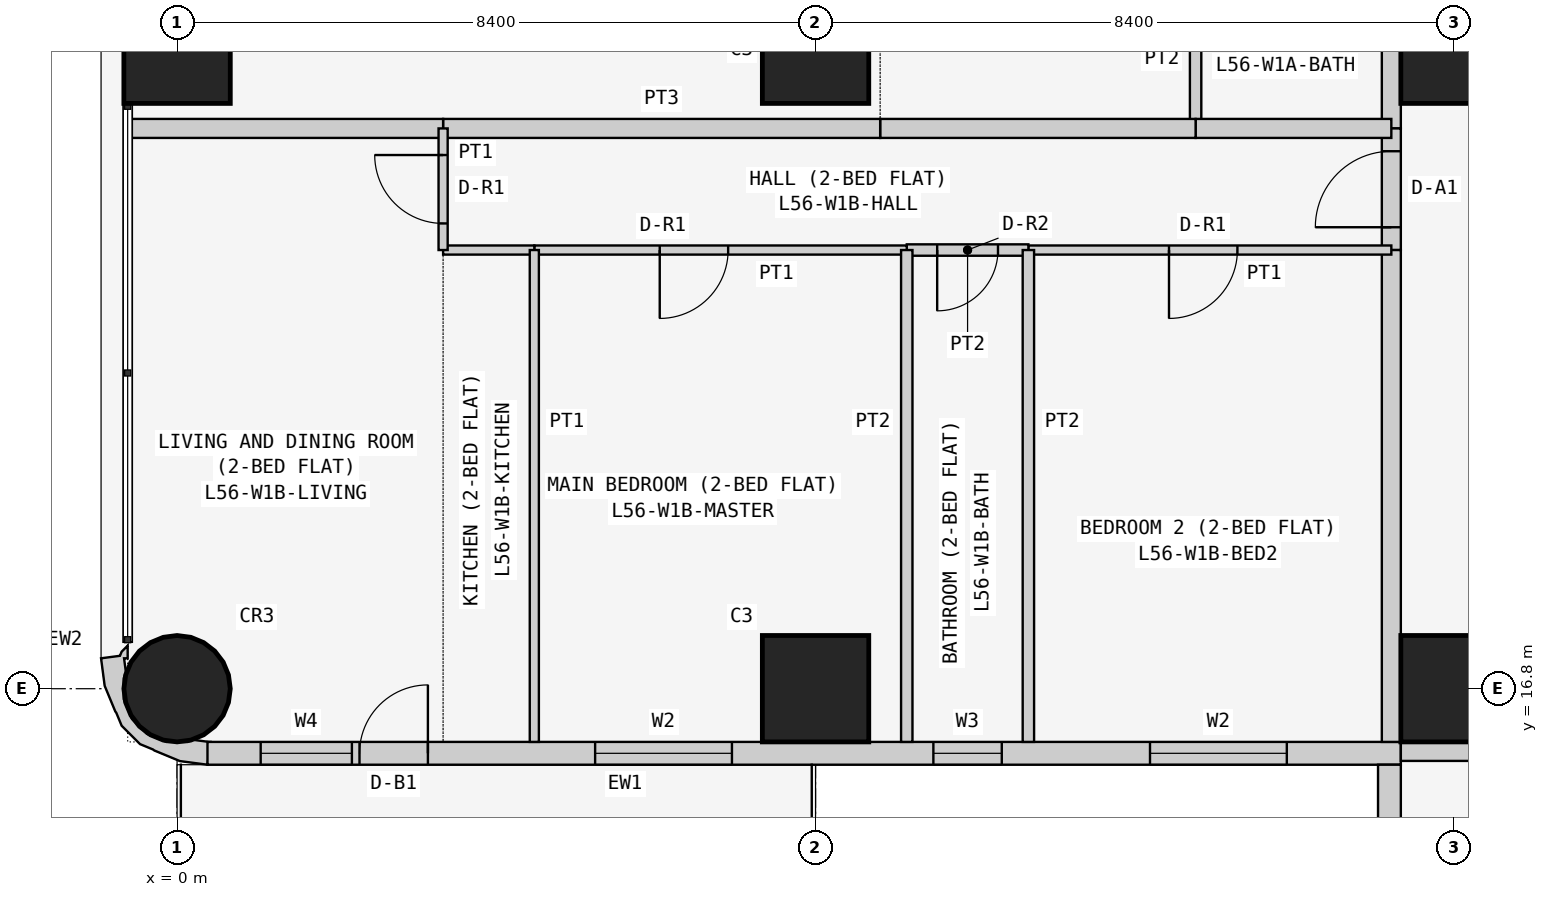
"""IFC4 building model, lengths in metres.
Left out: names, types, materials, properties, quantities, classifications, styles, units other than length and angle.
Written with IfcOpenShell. Run it as: python <this file> out.ifc"""

import sys

from ifc_helpers import new_model, si_unit, direction, frame, frame_2d, origin, origin_2d, place, context, subcontext, project, spatial, polyline, rectangle, circle, outline, extrude, element, fill, save


model = new_model("IFC4")
c1 = context("Model", 3, precision=1e-05, world=origin(), true_north=direction((0.0, 1.0)))
c2 = subcontext(c1, "Body", "Model", "MODEL_VIEW")
j1 = project(units=[si_unit("LENGTHUNIT", "METRE"), si_unit("PLANEANGLEUNIT", "RADIAN")], contexts=[c1])
p1 = place(None, origin())
s1 = spatial("IfcSite", under=j1, at=p1, CompositionType="ELEMENT")
p2 = place(p1, origin())
s2 = spatial("IfcBuilding", under=s1, at=p2, CompositionType="ELEMENT")
p3 = place(p2, frame((0.0, 0.0, 215.7)))
s3 = spatial("IfcBuildingStorey", under=s2, at=p3, CompositionType="ELEMENT", Elevation=215.7)
p4 = place(p3, frame((0.0, 16.8, 0.0), z_axis=(0.0, 0.0, 1.0), x_axis=(1.0, 0.0, 0.0)))
e1 = element("IfcColumn", 1, at=p4, inside=s3, PredefinedType="COLUMN", context=c2, shape_type="SweptSolid", body=[
    extrude(circle(Radius=0.7, at=origin_2d()), origin(), (0.0, 0.0, 1.0), 3.6),
])
for number, where, z_axis, x_axis in (
    (2, (0.0, 25.2, 0.0), (0.0, 0.0, 1.0), (1.0, 0.0, 0.0)),
    (3, (8.4, 16.8, 0.0), (0.0, 0.0, 1.0), (1.0, 0.0, 0.0)),
    (4, (8.4, 25.2, 0.0), (0.0, 0.0, 1.0), (1.0, 0.0, 0.0)),
    (5, (16.8, 16.8, 0.0), (0.0, 0.0, 1.0), (1.0, 0.0, 0.0)),
    (6, (16.8, 25.2, 0.0), (0.0, 0.0, 1.0), (1.0, 0.0, 0.0)),
):
    element("IfcColumn", number, at=place(p3, frame(where, z_axis=z_axis, x_axis=x_axis)), inside=s3, PredefinedType="COLUMN", context=c2, shape_type="SweptSolid", body=[
        extrude(rectangle(XDim=1.4, YDim=1.4, at=origin_2d()), origin(), (0.0, 0.0, 1.0), 3.6),
    ])
p5 = place(p3, frame((0.4, 15.95, 0.0), z_axis=(0.0, 0.0, 1.0), x_axis=(1.0, 0.0, 0.0)))
e7 = element("IfcWall", 7, at=p5, inside=s3, PredefinedType="SOLIDWALL", context=c2, shape_type="SweptSolid", body=[
    extrude(rectangle(XDim=15.7, YDim=0.3, at=frame_2d((7.85, 0.0))), origin(), (0.0, 0.0, 1.0), 3.45),
])
p6 = place(p5, frame((12.4, 0.0, 0.9)))
e8 = element("IfcOpeningElement", 8, at=p6, cuts=e7, PredefinedType="OPENING", context=c2, shape_type="SweptSolid", body=[
    extrude(rectangle(XDim=1.8, YDim=1.5, at=frame_2d((0.9, 0.75))), frame((0.0, 0.16, 0.0), z_axis=(0.0, -1.0, 0.0), x_axis=(1.0, 0.0, 0.0)), (0.0, 0.0, 1.0), 0.32),
])
p7 = place(p5, frame((9.55, 0.0, 1.5)))
e9 = element("IfcOpeningElement", 9, at=p7, cuts=e7, PredefinedType="OPENING", context=c2, shape_type="SweptSolid", body=[
    extrude(rectangle(XDim=0.9, YDim=0.7, at=frame_2d((0.45, 0.35))), frame((0.0, 0.16, 0.0), z_axis=(0.0, -1.0, 0.0), x_axis=(1.0, 0.0, 0.0)), (0.0, 0.0, 1.0), 0.32),
])
p8 = place(p5, frame((5.1, 0.0, 0.9)))
e10 = element("IfcOpeningElement", 10, at=p8, cuts=e7, PredefinedType="OPENING", context=c2, shape_type="SweptSolid", body=[
    extrude(rectangle(XDim=1.8, YDim=1.5, at=frame_2d((0.9, 0.75))), frame((0.0, 0.16, 0.0), z_axis=(0.0, -1.0, 0.0), x_axis=(1.0, 0.0, 0.0)), (0.0, 0.0, 1.0), 0.32),
])
p9 = place(p5, frame((2.0, 0.0, 0.0)))
e11 = element("IfcOpeningElement", 11, at=p9, cuts=e7, PredefinedType="OPENING", context=c2, shape_type="SweptSolid", body=[
    extrude(rectangle(XDim=0.9, YDim=2.4, at=frame_2d((0.45, 1.2))), frame((0.0, 0.16, 0.0), z_axis=(0.0, -1.0, 0.0), x_axis=(1.0, 0.0, 0.0)), (0.0, 0.0, 1.0), 0.32),
])
p10 = place(p5, frame((0.7, 0.0, 0.9)))
e12 = element("IfcOpeningElement", 12, at=p10, cuts=e7, PredefinedType="OPENING", context=c2, shape_type="SweptSolid", body=[
    extrude(rectangle(XDim=1.2, YDim=1.5, at=frame_2d((0.6, 0.75))), frame((0.0, 0.16, 0.0), z_axis=(0.0, -1.0, 0.0), x_axis=(1.0, 0.0, 0.0)), (0.0, 0.0, 1.0), 0.32),
])
p11 = place(p3, frame((15.95, 15.8, 0.0), z_axis=(0.0, 0.0, 1.0), x_axis=(0.0, -1.0, 0.0)))
e13 = element("IfcWall", 13, at=p11, inside=s3, PredefinedType="SOLIDWALL", context=c2, shape_type="SweptSolid", body=[
    extrude(rectangle(XDim=7.0, YDim=0.3, at=frame_2d((3.5, 0.0))), origin(), (0.0, 0.0, 1.0), 3.45),
])
p12 = place(p11, frame((1.5, 0.0, 0.9)))
e14 = element("IfcOpeningElement", 14, at=p12, cuts=e13, PredefinedType="OPENING", context=c2, shape_type="SweptSolid", body=[
    extrude(rectangle(XDim=2.4, YDim=1.5, at=frame_2d((1.2, 0.75))), frame((0.0, 0.16, 0.0), z_axis=(0.0, -1.0, 0.0), x_axis=(1.0, 0.0, 0.0)), (0.0, 0.0, 1.0), 0.32),
])
p13 = place(p11, frame((5.05, 0.0, 0.9)))
e15 = element("IfcOpeningElement", 15, at=p13, cuts=e13, PredefinedType="OPENING", context=c2, shape_type="SweptSolid", body=[
    extrude(rectangle(XDim=1.2, YDim=1.5, at=frame_2d((0.6, 0.75))), frame((0.0, 0.16, 0.0), z_axis=(0.0, -1.0, 0.0), x_axis=(1.0, 0.0, 0.0)), (0.0, 0.0, 1.0), 0.32),
])
p14 = place(p3, frame((-0.588, 17.312, 0.0), z_axis=(0.0, 0.0, 1.0), x_axis=(-0.898030234854, -0.439933741929, 0.0)))
e16 = element("IfcWall", 16, at=p14, inside=s3, PredefinedType="SOLIDWALL", context=c2, shape_type="SweptSolid", body=[
    extrude(outline(polyline([(-0.222, 1.793), (-0.39, 1.541), (-0.372, 1.532), (-0.195, 1.415), (-0.12, 1.41), (0.131, 1.287), (0.315, 1.078), (0.406, 0.814), (0.388, 0.536), (0.265, 0.285), (0.209, 0.236), (0.148, 0.053), (0.105, 0.074), (0.032, -0.076), (0.138, -0.039), (0.182, -0.0), (0.419, -0.08), (0.536, 0.266), (0.559, 0.631), (0.555, 0.651), (0.566, 0.836), (0.456, 1.159), (0.333, 1.298), (0.324, 1.316), (0.082, 1.591), (-0.222, 1.793)])), origin(), (0.0, 0.0, 1.0), 3.45),
])
p15 = place(p3, frame((22.971, 15.975, 0.0), z_axis=(0.0, 0.0, 1.0), x_axis=(-1.0, 0.0, 0.0)))
e17 = element("IfcWall", 17, at=p15, inside=s3, PredefinedType="PARTITIONING", context=c2, shape_type="SweptSolid", body=[
    extrude(rectangle(XDim=6.871, YDim=0.25, at=frame_2d((3.436, 0.0))), origin(), (0.0, 0.0, 1.0), 3.45),
])
p16 = place(p3, frame((15.975, 24.171, 0.0), z_axis=(0.0, 0.0, 1.0), x_axis=(0.0, 1.0, 0.0)))
e18 = element("IfcWall", 18, at=p16, inside=s3, PredefinedType="PARTITIONING", context=c2, shape_type="SweptSolid", body=[
    extrude(rectangle(XDim=2.629, YDim=0.25, at=frame_2d((1.314, 0.0))), origin(), (0.0, 0.0, 1.0), 3.45),
])
p17 = place(p3, frame((15.975, 22.571, 0.0), z_axis=(0.0, 0.0, 1.0), x_axis=(0.0, 1.0, 0.0)))
e19 = element("IfcWall", 19, at=p17, inside=s3, PredefinedType="PARTITIONING", context=c2, shape_type="SweptSolid", body=[
    extrude(rectangle(XDim=1.6, YDim=0.25, at=frame_2d((0.8, 0.0))), origin(), (0.0, 0.0, 1.0), 3.45),
])
p18 = place(p17, frame((0.3, 0.0, 0.0)))
e20 = element("IfcOpeningElement", 20, at=p18, cuts=e19, PredefinedType="OPENING", context=c2, shape_type="SweptSolid", body=[
    extrude(rectangle(XDim=1.0, YDim=2.1, at=frame_2d((0.5, 1.05))), frame((0.0, 0.135, 0.0), z_axis=(0.0, -1.0, 0.0), x_axis=(1.0, 0.0, 0.0)), (0.0, 0.0, 1.0), 0.27),
])
p19 = place(p3, frame((15.975, 16.1, 0.0), z_axis=(0.0, 0.0, 1.0), x_axis=(0.0, 1.0, 0.0)))
e21 = element("IfcWall", 21, at=p19, inside=s3, PredefinedType="PARTITIONING", context=c2, shape_type="SweptSolid", body=[
    extrude(rectangle(XDim=6.471, YDim=0.25, at=frame_2d((3.235, 0.0))), origin(), (0.0, 0.0, 1.0), 3.45),
])
p20 = place(p3, frame((13.4, 26.8, 0.0), z_axis=(0.0, 0.0, 1.0), x_axis=(0.0, -1.0, 0.0)))
e22 = element("IfcWall", 22, at=p20, inside=s3, PredefinedType="PARTITIONING", context=c2, shape_type="SweptSolid", body=[
    extrude(rectangle(XDim=2.629, YDim=0.15, at=frame_2d((1.314, 0.0))), origin(), (0.0, 0.0, 1.0), 3.45),
])
p21 = place(p3, frame((13.4, 24.171, 0.0), z_axis=(0.0, 0.0, 1.0), x_axis=(1.0, 0.0, 0.0)))
e23 = element("IfcWall", 23, at=p21, inside=s3, PredefinedType="PARTITIONING", context=c2, shape_type="SweptSolid", body=[
    extrude(rectangle(XDim=2.575, YDim=0.25, at=frame_2d((1.288, 0.0))), origin(), (0.0, 0.0, 1.0), 3.45),
])
p22 = place(p3, frame((9.25, 24.171, 0.0), z_axis=(0.0, 0.0, 1.0), x_axis=(1.0, 0.0, 0.0)))
e24 = element("IfcWall", 24, at=p22, inside=s3, PredefinedType="PARTITIONING", context=c2, shape_type="SweptSolid", body=[
    extrude(rectangle(XDim=4.15, YDim=0.25, at=frame_2d((2.075, 0.0))), origin(), (0.0, 0.0, 1.0), 3.45),
])
p23 = place(p3, frame((3.5, 24.171, 0.0), z_axis=(0.0, 0.0, 1.0), x_axis=(1.0, 0.0, 0.0)))
e25 = element("IfcWall", 25, at=p23, inside=s3, PredefinedType="PARTITIONING", context=c2, shape_type="SweptSolid", body=[
    extrude(rectangle(XDim=5.75, YDim=0.25, at=frame_2d((2.875, 0.0))), origin(), (0.0, 0.0, 1.0), 3.45),
])
p24 = place(p3, frame((-0.65, 24.171, 0.0), z_axis=(0.0, 0.0, 1.0), x_axis=(1.0, 0.0, 0.0)))
e26 = element("IfcWall", 26, at=p24, inside=s3, PredefinedType="PARTITIONING", context=c2, shape_type="SweptSolid", body=[
    extrude(rectangle(XDim=4.15, YDim=0.25, at=frame_2d((2.075, 0.0))), origin(), (0.0, 0.0, 1.0), 3.45),
])
p25 = place(p3, frame((11.2, 22.571, 0.0), z_axis=(0.0, 0.0, 1.0), x_axis=(1.0, 0.0, 0.0)))
e27 = element("IfcWall", 27, at=p25, inside=s3, PredefinedType="PARTITIONING", context=c2, shape_type="SweptSolid", body=[
    extrude(rectangle(XDim=4.775, YDim=0.12, at=frame_2d((2.388, 0.0))), origin(), (0.0, 0.0, 1.0), 3.45),
])
p26 = place(p25, frame((1.85, 0.0, 0.0)))
e28 = element("IfcOpeningElement", 28, at=p26, cuts=e27, PredefinedType="OPENING", context=c2, shape_type="SweptSolid", body=[
    extrude(rectangle(XDim=0.9, YDim=2.1, at=frame_2d((0.45, 1.05))), frame((0.0, 0.07, 0.0), z_axis=(0.0, -1.0, 0.0), x_axis=(1.0, 0.0, 0.0)), (0.0, 0.0, 1.0), 0.14),
])
p27 = place(p3, frame((9.6, 22.571, 0.0), z_axis=(0.0, 0.0, 1.0), x_axis=(1.0, 0.0, 0.0)))
e29 = element("IfcWall", 29, at=p27, inside=s3, PredefinedType="PARTITIONING", context=c2, shape_type="SweptSolid", body=[
    extrude(rectangle(XDim=1.6, YDim=0.15, at=frame_2d((0.8, 0.0))), origin(), (0.0, 0.0, 1.0), 3.45),
])
p28 = place(p27, frame((0.4, 0.0, 0.0)))
e30 = element("IfcOpeningElement", 30, at=p28, cuts=e29, PredefinedType="OPENING", context=c2, shape_type="SweptSolid", body=[
    extrude(rectangle(XDim=0.8, YDim=2.1, at=frame_2d((0.4, 1.05))), frame((0.0, 0.085, 0.0), z_axis=(0.0, -1.0, 0.0), x_axis=(1.0, 0.0, 0.0)), (0.0, 0.0, 1.0), 0.17),
])
p29 = place(p3, frame((4.7, 22.571, 0.0), z_axis=(0.0, 0.0, 1.0), x_axis=(1.0, 0.0, 0.0)))
e31 = element("IfcWall", 31, at=p29, inside=s3, PredefinedType="PARTITIONING", context=c2, shape_type="SweptSolid", body=[
    extrude(rectangle(XDim=4.9, YDim=0.12, at=frame_2d((2.45, 0.0))), origin(), (0.0, 0.0, 1.0), 3.45),
])
p30 = place(p29, frame((1.65, 0.0, 0.0)))
e32 = element("IfcOpeningElement", 32, at=p30, cuts=e31, PredefinedType="OPENING", context=c2, shape_type="SweptSolid", body=[
    extrude(rectangle(XDim=0.9, YDim=2.1, at=frame_2d((0.45, 1.05))), frame((0.0, 0.07, 0.0), z_axis=(0.0, -1.0, 0.0), x_axis=(1.0, 0.0, 0.0)), (0.0, 0.0, 1.0), 0.14),
])
p31 = place(p3, frame((3.5, 22.571, 0.0), z_axis=(0.0, 0.0, 1.0), x_axis=(1.0, 0.0, 0.0)))
e33 = element("IfcWall", 33, at=p31, inside=s3, PredefinedType="PARTITIONING", context=c2, shape_type="SweptSolid", body=[
    extrude(rectangle(XDim=1.2, YDim=0.12, at=frame_2d((0.6, 0.0))), origin(), (0.0, 0.0, 1.0), 3.45),
])
p32 = place(p3, frame((3.5, 24.171, 0.0), z_axis=(0.0, 0.0, 1.0), x_axis=(0.0, -1.0, 0.0)))
e34 = element("IfcWall", 34, at=p32, inside=s3, PredefinedType="PARTITIONING", context=c2, shape_type="SweptSolid", body=[
    extrude(rectangle(XDim=1.6, YDim=0.12, at=frame_2d((0.8, 0.0))), origin(), (0.0, 0.0, 1.0), 3.45),
])
p33 = place(p32, frame((0.35, 0.0, 0.0)))
e35 = element("IfcOpeningElement", 35, at=p33, cuts=e34, PredefinedType="OPENING", context=c2, shape_type="SweptSolid", body=[
    extrude(rectangle(XDim=0.9, YDim=2.1, at=frame_2d((0.45, 1.05))), frame((0.0, 0.07, 0.0), z_axis=(0.0, -1.0, 0.0), x_axis=(1.0, 0.0, 0.0)), (0.0, 0.0, 1.0), 0.14),
])
for number, where, z_axis, x_axis in (
    (36, (11.2, 22.571, 0.0), (0.0, 0.0, 1.0), (0.0, -1.0, 0.0)),
    (37, (9.6, 22.571, 0.0), (0.0, 0.0, 1.0), (0.0, -1.0, 0.0)),
):
    element("IfcWall", number, at=place(p3, frame(where, z_axis=z_axis, x_axis=x_axis)), inside=s3, PredefinedType="PARTITIONING", context=c2, shape_type="SweptSolid", body=[
        extrude(rectangle(XDim=6.471, YDim=0.15, at=frame_2d((3.235, 0.0))), origin(), (0.0, 0.0, 1.0), 3.45),
    ])
p34 = place(p3, frame((4.7, 22.571, 0.0), z_axis=(0.0, 0.0, 1.0), x_axis=(0.0, -1.0, 0.0)))
e38 = element("IfcWall", 38, at=p34, inside=s3, PredefinedType="PARTITIONING", context=c2, shape_type="SweptSolid", body=[
    extrude(rectangle(XDim=6.471, YDim=0.12, at=frame_2d((3.235, 0.0))), origin(), (0.0, 0.0, 1.0), 3.45),
])
p35 = place(p6, origin())
e39 = element("IfcWindow", 39, at=p35, inside=s3, PartitioningType="SINGLE_PANEL", PredefinedType="WINDOW", context=c2, shape_type="SweptSolid", body=[
    extrude(rectangle(XDim=1.8, YDim=1.5, at=frame_2d((0.9, 0.75))), frame((0.0, 0.03, 0.0), z_axis=(0.0, -1.0, 0.0), x_axis=(1.0, 0.0, 0.0)), (0.0, 0.0, 1.0), 0.06),
])
fill(e8, e39)
p36 = place(p7, origin())
e40 = element("IfcWindow", 40, at=p36, inside=s3, PartitioningType="SINGLE_PANEL", PredefinedType="WINDOW", context=c2, shape_type="SweptSolid", body=[
    extrude(rectangle(XDim=0.9, YDim=0.7, at=frame_2d((0.45, 0.35))), frame((0.0, 0.03, 0.0), z_axis=(0.0, -1.0, 0.0), x_axis=(1.0, 0.0, 0.0)), (0.0, 0.0, 1.0), 0.06),
])
fill(e9, e40)
p37 = place(p8, origin())
e41 = element("IfcWindow", 41, at=p37, inside=s3, PartitioningType="SINGLE_PANEL", PredefinedType="WINDOW", context=c2, shape_type="SweptSolid", body=[
    extrude(rectangle(XDim=1.8, YDim=1.5, at=frame_2d((0.9, 0.75))), frame((0.0, 0.03, 0.0), z_axis=(0.0, -1.0, 0.0), x_axis=(1.0, 0.0, 0.0)), (0.0, 0.0, 1.0), 0.06),
])
fill(e10, e41)
p38 = place(p9, origin())
e42 = element("IfcDoor", 42, at=p38, inside=s3, OperationType="SINGLE_SWING_RIGHT", PredefinedType="DOOR", context=c2, shape_type="SweptSolid", body=[
    extrude(rectangle(XDim=0.9, YDim=2.4, at=frame_2d((0.45, 1.2))), frame((0.0, 0.025, 0.0), z_axis=(0.0, -1.0, 0.0), x_axis=(1.0, 0.0, 0.0)), (0.0, 0.0, 1.0), 0.05),
])
fill(e11, e42)
p39 = place(p10, origin())
e43 = element("IfcWindow", 43, at=p39, inside=s3, PartitioningType="SINGLE_PANEL", PredefinedType="WINDOW", context=c2, shape_type="SweptSolid", body=[
    extrude(rectangle(XDim=1.2, YDim=1.5, at=frame_2d((0.6, 0.75))), frame((0.0, 0.03, 0.0), z_axis=(0.0, -1.0, 0.0), x_axis=(1.0, 0.0, 0.0)), (0.0, 0.0, 1.0), 0.06),
])
fill(e12, e43)
p40 = place(p18, origin())
e44 = element("IfcDoor", 44, at=p40, inside=s3, OperationType="SINGLE_SWING_LEFT", PredefinedType="DOOR", context=c2, shape_type="SweptSolid", body=[
    extrude(rectangle(XDim=1.0, YDim=2.1, at=frame_2d((0.5, 1.05))), frame((0.0, 0.025, 0.0), z_axis=(0.0, -1.0, 0.0), x_axis=(1.0, 0.0, 0.0)), (0.0, 0.0, 1.0), 0.05),
])
fill(e20, e44)
p41 = place(p26, frame((0.9, 0.0, 0.0), z_axis=(0.0, 0.0, 1.0), x_axis=(-1.0, 0.0, 0.0)))
e45 = element("IfcDoor", 45, at=p41, inside=s3, OperationType="SINGLE_SWING_RIGHT", PredefinedType="DOOR", context=c2, shape_type="SweptSolid", body=[
    extrude(rectangle(XDim=0.9, YDim=2.1, at=frame_2d((0.45, 1.05))), frame((0.0, 0.025, 0.0), z_axis=(0.0, -1.0, 0.0), x_axis=(1.0, 0.0, 0.0)), (0.0, 0.0, 1.0), 0.05),
])
fill(e28, e45)
p42 = place(p28, frame((0.8, 0.0, 0.0), z_axis=(0.0, 0.0, 1.0), x_axis=(-1.0, 0.0, 0.0)))
e46 = element("IfcDoor", 46, at=p42, inside=s3, OperationType="SINGLE_SWING_RIGHT", PredefinedType="DOOR", context=c2, shape_type="SweptSolid", body=[
    extrude(rectangle(XDim=0.8, YDim=2.1, at=frame_2d((0.4, 1.05))), frame((0.0, 0.025, 0.0), z_axis=(0.0, -1.0, 0.0), x_axis=(1.0, 0.0, 0.0)), (0.0, 0.0, 1.0), 0.05),
])
fill(e30, e46)
p43 = place(p30, frame((0.9, 0.0, 0.0), z_axis=(0.0, 0.0, 1.0), x_axis=(-1.0, 0.0, 0.0)))
e47 = element("IfcDoor", 47, at=p43, inside=s3, OperationType="SINGLE_SWING_RIGHT", PredefinedType="DOOR", context=c2, shape_type="SweptSolid", body=[
    extrude(rectangle(XDim=0.9, YDim=2.1, at=frame_2d((0.45, 1.05))), frame((0.0, 0.025, 0.0), z_axis=(0.0, -1.0, 0.0), x_axis=(1.0, 0.0, 0.0)), (0.0, 0.0, 1.0), 0.05),
])
fill(e32, e47)
p44 = place(p33, frame((0.9, 0.0, 0.0), z_axis=(0.0, 0.0, 1.0), x_axis=(-1.0, 0.0, 0.0)))
e48 = element("IfcDoor", 48, at=p44, inside=s3, OperationType="SINGLE_SWING_RIGHT", PredefinedType="DOOR", context=c2, shape_type="SweptSolid", body=[
    extrude(rectangle(XDim=0.9, YDim=2.1, at=frame_2d((0.45, 1.05))), frame((0.0, 0.025, 0.0), z_axis=(0.0, -1.0, 0.0), x_axis=(1.0, 0.0, 0.0)), (0.0, 0.0, 1.0), 0.05),
])
fill(e35, e48)
save(model, sys.argv[1])
